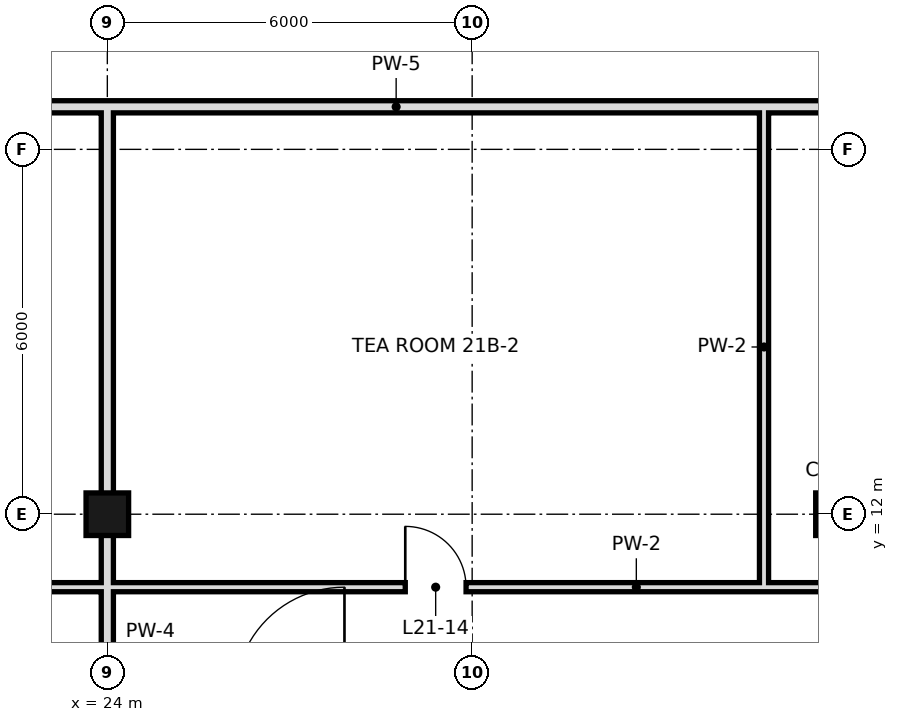
"""IFC4 building model, lengths in metres.
Left out: names, types, materials, properties, quantities, classifications, styles, units other than length and angle.
Written with IfcOpenShell. Run it as: python <this file> out.ifc"""

import sys

from ifc_helpers import new_model, si_unit, direction, frame, frame_2d, origin, origin_2d, place, context, subcontext, project, spatial, rectangle, hollow_rectangle, extrude, element, fill, save


model = new_model("IFC4")
c1 = context("Model", 3, precision=1e-05, world=origin(), true_north=direction((0.0, 1.0)))
c2 = subcontext(c1, "Body", "Model", "MODEL_VIEW")
j1 = project(units=[si_unit("LENGTHUNIT", "METRE"), si_unit("PLANEANGLEUNIT", "RADIAN")], contexts=[c1])
p1 = place(None, origin())
s1 = spatial("IfcSite", under=j1, at=p1, CompositionType="ELEMENT")
p2 = place(p1, origin())
s2 = spatial("IfcBuilding", under=s1, at=p2, CompositionType="ELEMENT")
p3 = place(p2, frame((0.0, 0.0, 99.8)))
s3 = spatial("IfcBuildingStorey", under=s2, at=p3, CompositionType="ELEMENT", Elevation=99.8)
for number, where, z_axis, x_axis in (
    (1, (24.0, 12.0, 0.0), (0.0, 0.0, 1.0), (1.0, 0.0, 0.0)),
    (2, (36.0, 12.0, 0.0), (0.0, 0.0, 1.0), (1.0, 0.0, 0.0)),
):
    element("IfcColumn", number, at=place(p3, frame(where, z_axis=z_axis, x_axis=x_axis)), inside=s3, PredefinedType="COLUMN", context=c2, shape_type="SweptSolid", body=[
        extrude(hollow_rectangle(XDim=0.7, YDim=0.7, WallThickness=0.036, at=origin_2d()), origin(), (0.0, 0.0, 1.0), 3.6),
    ])
p4 = place(p3, frame((24.0, 0.0, 0.0), z_axis=(0.0, 0.0, 1.0), x_axis=(0.0, 1.0, 0.0)))
e3 = element("IfcWall", 3, at=p4, inside=s3, PredefinedType="SOLIDWALL", context=c2, shape_type="SweptSolid", body=[
    extrude(rectangle(XDim=18.7, YDim=0.2, at=frame_2d((9.35, 0.0))), origin(), (0.0, 0.0, 1.0), 2.72),
])
p5 = place(p3, frame((34.8, 10.8, 0.0), z_axis=(0.0, 0.0, 1.0), x_axis=(0.0, 1.0, 0.0)))
e4 = element("IfcWall", 4, at=p5, inside=s3, PredefinedType="PARTITIONING", context=c2, shape_type="SweptSolid", body=[
    extrude(rectangle(XDim=7.9, YDim=0.15, at=frame_2d((3.95, 0.0))), origin(), (0.0, 0.0, 1.0), 3.42),
])
p6 = place(p3, frame((12.6, 10.8, 0.0), z_axis=(0.0, 0.0, 1.0), x_axis=(1.0, 0.0, 0.0)))
e5 = element("IfcWall", 5, at=p6, inside=s3, PredefinedType="PARTITIONING", context=c2, shape_type="SweptSolid", body=[
    extrude(rectangle(XDim=40.2, YDim=0.15, at=frame_2d((20.1, 0.0))), origin(), (0.0, 0.0, 1.0), 3.42),
])
p7 = place(p6, frame((8.5, 0.0, 0.0)))
e6 = element("IfcOpeningElement", 6, at=p7, cuts=e5, PredefinedType="OPENING", context=c2, shape_type="SweptSolid", body=[
    extrude(rectangle(XDim=1.0, YDim=2.4, at=frame_2d((0.5, 1.2))), frame((0.0, 0.085, 0.0), z_axis=(0.0, -1.0, 0.0), x_axis=(1.0, 0.0, 0.0)), (0.0, 0.0, 1.0), 0.17),
])
p8 = place(p6, frame((1.78, 0.0, 0.0)))
e7 = element("IfcOpeningElement", 7, at=p8, cuts=e5, PredefinedType="OPENING", context=c2, shape_type="SweptSolid", body=[
    extrude(rectangle(XDim=1.0, YDim=2.4, at=frame_2d((0.5, 1.2))), frame((0.0, 0.085, 0.0), z_axis=(0.0, -1.0, 0.0), x_axis=(1.0, 0.0, 0.0)), (0.0, 0.0, 1.0), 0.17),
])
p9 = place(p6, frame((23.8, 0.0, 0.0)))
e8 = element("IfcOpeningElement", 8, at=p9, cuts=e5, PredefinedType="OPENING", context=c2, shape_type="SweptSolid", body=[
    extrude(rectangle(XDim=1.0, YDim=2.4, at=frame_2d((0.5, 1.2))), frame((0.0, 0.085, 0.0), z_axis=(0.0, -1.0, 0.0), x_axis=(1.0, 0.0, 0.0)), (0.0, 0.0, 1.0), 0.17),
])
p10 = place(p6, frame((16.3, 0.0, 0.0)))
e9 = element("IfcOpeningElement", 9, at=p10, cuts=e5, PredefinedType="OPENING", context=c2, shape_type="SweptSolid", body=[
    extrude(rectangle(XDim=1.0, YDim=2.4, at=frame_2d((0.5, 1.2))), frame((0.0, 0.085, 0.0), z_axis=(0.0, -1.0, 0.0), x_axis=(1.0, 0.0, 0.0)), (0.0, 0.0, 1.0), 0.17),
])
p11 = place(p6, frame((33.7, 0.0, 0.0)))
e10 = element("IfcOpeningElement", 10, at=p11, cuts=e5, PredefinedType="OPENING", context=c2, shape_type="SweptSolid", body=[
    extrude(rectangle(XDim=1.0, YDim=2.4, at=frame_2d((0.5, 1.2))), frame((0.0, 0.085, 0.0), z_axis=(0.0, -1.0, 0.0), x_axis=(1.0, 0.0, 0.0)), (0.0, 0.0, 1.0), 0.17),
])
p12 = place(p3, frame((12.6, 18.7, 0.0), z_axis=(0.0, 0.0, 1.0), x_axis=(1.0, 0.0, 0.0)))
e11 = element("IfcWall", 11, at=p12, inside=s3, PredefinedType="SOLIDWALL", context=c2, shape_type="SweptSolid", body=[
    extrude(rectangle(XDim=32.3, YDim=0.2, at=frame_2d((16.15, 0.0))), origin(), (0.0, 0.0, 1.0), 2.72),
])
p13 = place(p12, frame((7.78, 0.0, 0.0)))
e12 = element("IfcOpeningElement", 12, at=p13, cuts=e11, PredefinedType="OPENING", context=c2, shape_type="SweptSolid", body=[
    extrude(rectangle(XDim=1.2, YDim=2.4, at=frame_2d((0.6, 1.2))), frame((0.0, 0.11, 0.0), z_axis=(0.0, -1.0, 0.0), x_axis=(1.0, 0.0, 0.0)), (0.0, 0.0, 1.0), 0.22),
])
p14 = place(p12, frame((24.6, 0.0, 0.0)))
e13 = element("IfcOpeningElement", 13, at=p14, cuts=e11, PredefinedType="OPENING", context=c2, shape_type="SweptSolid", body=[
    extrude(rectangle(XDim=1.2, YDim=2.4, at=frame_2d((0.6, 1.2))), frame((0.0, 0.11, 0.0), z_axis=(0.0, -1.0, 0.0), x_axis=(1.0, 0.0, 0.0)), (0.0, 0.0, 1.0), 0.22),
])
p15 = place(p10, origin())
e14 = element("IfcDoor", 14, at=p15, inside=s3, OperationType="SINGLE_SWING_LEFT", PredefinedType="DOOR", context=c2, shape_type="SweptSolid", body=[
    extrude(rectangle(XDim=1.0, YDim=2.4, at=frame_2d((0.5, 1.2))), frame((0.0, 0.025, 0.0), z_axis=(0.0, -1.0, 0.0), x_axis=(1.0, 0.0, 0.0)), (0.0, 0.0, 1.0), 0.05),
])
fill(e9, e14)
save(model, sys.argv[1])
